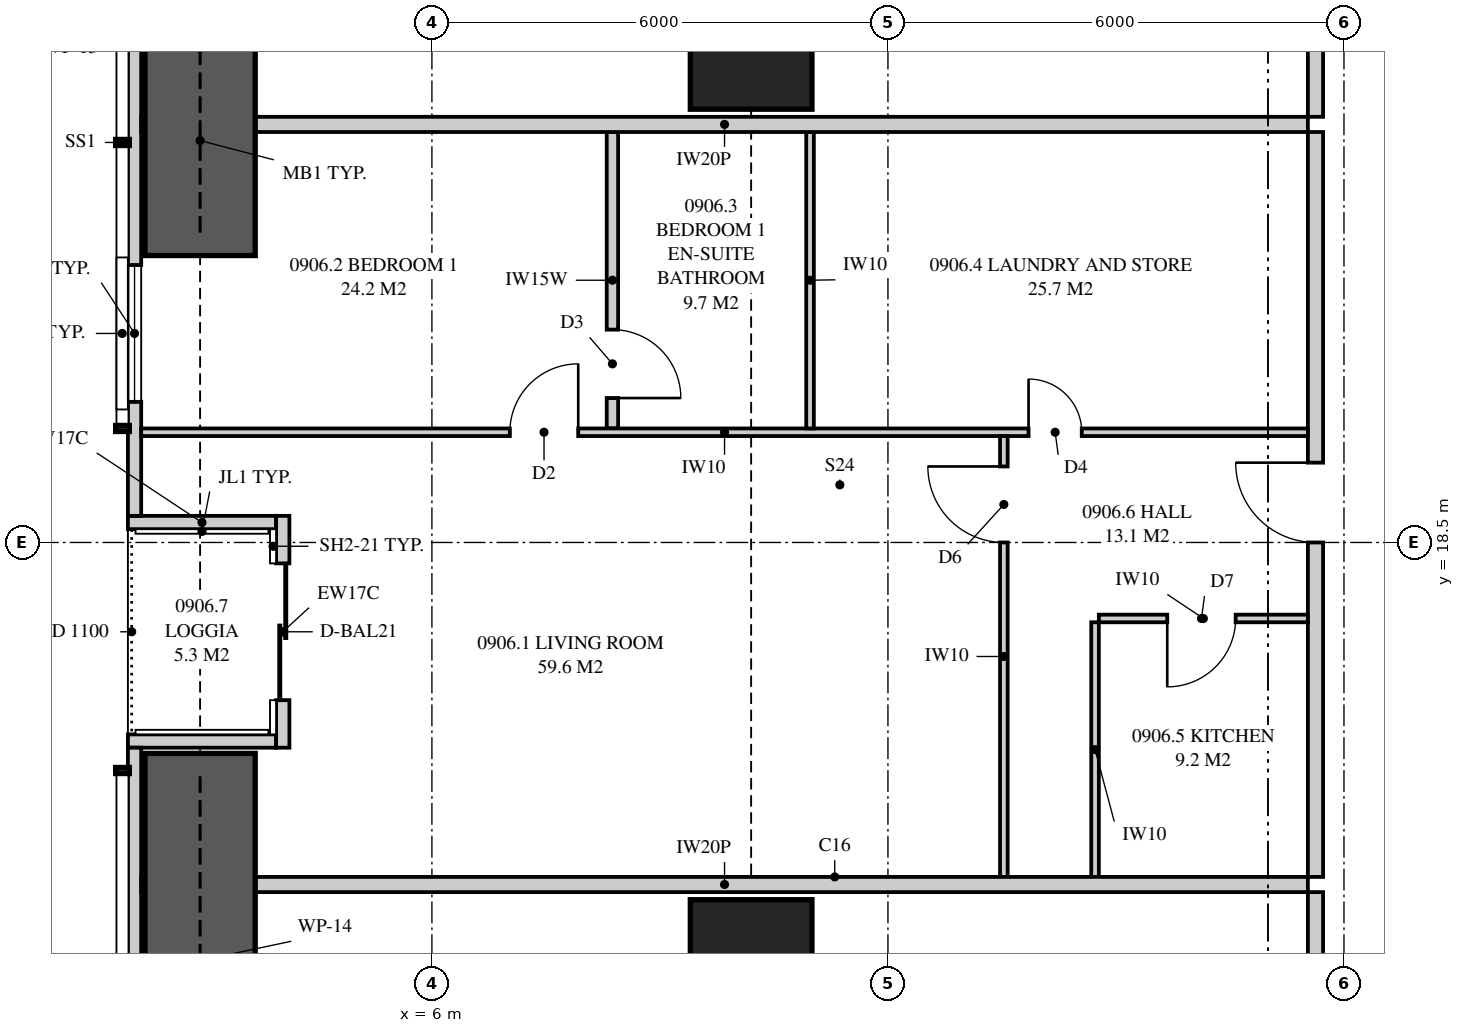
"""IFC4 building model, lengths in metres.
Left out: names, types, materials, properties, quantities, classifications, styles, units other than length and angle.
Written with IfcOpenShell. Run it as: python <this file> out.ifc"""

import sys

from ifc_helpers import new_model, si_unit, direction, frame, frame_2d, origin, origin_2d, place, context, subcontext, project, spatial, polyline, rectangle, outline, extrude, element, fill, save


model = new_model("IFC4")
c1 = context("Model", 3, precision=1e-05, world=origin(), true_north=direction((0.0, 1.0)))
c2 = subcontext(c1, "Body", "Model", "MODEL_VIEW")
j1 = project(units=[si_unit("LENGTHUNIT", "METRE"), si_unit("PLANEANGLEUNIT", "RADIAN")], contexts=[c1])
p1 = place(None, origin())
s1 = spatial("IfcSite", under=j1, at=p1, CompositionType="ELEMENT")
p2 = place(p1, origin())
s2 = spatial("IfcBuilding", under=s1, at=p2, CompositionType="ELEMENT")
p3 = place(p2, frame((0.0, 0.0, 37.75)))
s3 = spatial("IfcBuildingStorey", under=s2, at=p3, CompositionType="ELEMENT", Elevation=37.75)
for number, where, z_axis, x_axis in (
    (1, (10.2, 13.0, 0.0), (0.0, 0.0, 1.0), (1.0, 0.0, 0.0)),
    (2, (10.2, 25.0, 0.0), (0.0, 0.0, 1.0), (1.0, 0.0, 0.0)),
):
    element("IfcColumn", number, at=place(p3, frame(where, z_axis=z_axis, x_axis=x_axis)), inside=s3, PredefinedType="COLUMN", context=c2, shape_type="SweptSolid", body=[
        extrude(rectangle(XDim=1.6, YDim=1.6, at=origin_2d()), origin(), (0.0, 0.0, 1.0), 3.35),
    ])
p4 = place(p3, frame((2.087, 34.949, 0.0), z_axis=(0.0, 0.0, 1.0), x_axis=(0.0, -1.0, 0.0)))
e3 = element("IfcWall", 3, at=p4, inside=s3, PredefinedType="SOLIDWALL", context=c2, shape_type="SweptSolid", body=[
    extrude(outline(polyline([(0.0, 0.0), (16.099, 0.0), (16.099, 2.15), (9.949, 2.15), (9.949, 3.11), (9.823, 3.11), (9.823, 2.15), (9.73, 2.15), (9.73, 3.11), (0.0, 3.11), (0.0, 0.0)])), frame((0.0, 0.087, 0.0), z_axis=(0.0, -1.0, 0.0), x_axis=(1.0, 0.0, 0.0)), (0.0, 0.0, 1.0), 0.175),
])
p5 = place(p4, frame((2.757, 0.0, 0.4)))
e4 = element("IfcOpeningElement", 4, at=p5, cuts=e3, PredefinedType="OPENING", context=c2, shape_type="SweptSolid", body=[
    extrude(rectangle(XDim=1.8, YDim=1.7, at=frame_2d((0.9, 0.85))), frame((0.0, 0.097, 0.0), z_axis=(0.0, -1.0, 0.0), x_axis=(1.0, 0.0, 0.0)), (0.0, 0.0, 1.0), 0.195),
])
p6 = place(p4, frame((5.924, 0.0, 0.4)))
e5 = element("IfcOpeningElement", 5, at=p6, cuts=e3, PredefinedType="OPENING", context=c2, shape_type="SweptSolid", body=[
    extrude(rectangle(XDim=1.2, YDim=1.7, at=frame_2d((0.6, 0.85))), frame((0.0, 0.097, 0.0), z_axis=(0.0, -1.0, 0.0), x_axis=(1.0, 0.0, 0.0)), (0.0, 0.0, 1.0), 0.195),
])
p7 = place(p4, frame((12.799, 0.0, 0.4)))
e6 = element("IfcOpeningElement", 6, at=p7, cuts=e3, PredefinedType="OPENING", context=c2, shape_type="SweptSolid", body=[
    extrude(rectangle(XDim=1.8, YDim=1.7, at=frame_2d((0.9, 0.85))), frame((0.0, 0.097, 0.0), z_axis=(0.0, -1.0, 0.0), x_axis=(1.0, 0.0, 0.0)), (0.0, 0.0, 1.0), 0.195),
])
p8 = place(p3, frame((2.087, 15.8, 0.0), z_axis=(0.0, 0.0, 1.0), x_axis=(0.0, -1.0, 0.0)))
e7 = element("IfcWall", 7, at=p8, inside=s3, PredefinedType="SOLIDWALL", context=c2, shape_type="SweptSolid", body=[
    extrude(outline(polyline([(0.0, 0.0), (12.749, 0.0), (12.749, 3.11), (3.019, 3.11), (3.019, 2.15), (2.926, 2.15), (2.926, 3.11), (2.8, 3.11), (2.8, 2.15), (0.0, 2.15), (0.0, 0.0)])), frame((0.0, 0.087, 0.0), z_axis=(0.0, -1.0, 0.0), x_axis=(1.0, 0.0, 0.0)), (0.0, 0.0, 1.0), 0.175),
])
p9 = place(p8, frame((5.65, 0.0, 0.4)))
e8 = element("IfcOpeningElement", 8, at=p9, cuts=e7, PredefinedType="OPENING", context=c2, shape_type="SweptSolid", body=[
    extrude(rectangle(XDim=1.2, YDim=1.7, at=frame_2d((0.6, 0.85))), frame((0.0, 0.097, 0.0), z_axis=(0.0, -1.0, 0.0), x_axis=(1.0, 0.0, 0.0)), (0.0, 0.0, 1.0), 0.195),
])
p10 = place(p8, frame((8.691, 0.0, 0.4)))
e9 = element("IfcOpeningElement", 9, at=p10, cuts=e7, PredefinedType="OPENING", context=c2, shape_type="SweptSolid", body=[
    extrude(rectangle(XDim=1.8, YDim=1.7, at=frame_2d((0.9, 0.85))), frame((0.0, 0.097, 0.0), z_axis=(0.0, -1.0, 0.0), x_axis=(1.0, 0.0, 0.0)), (0.0, 0.0, 1.0), 0.195),
])
p11 = place(p3, frame((4.038, 18.85, 0.0), z_axis=(0.0, 0.0, 1.0), x_axis=(0.0, -1.0, 0.0)))
e10 = element("IfcWall", 10, at=p11, inside=s3, PredefinedType="SOLIDWALL", context=c2, shape_type="SweptSolid", body=[
    extrude(rectangle(XDim=3.05, YDim=0.175, at=frame_2d((1.525, 0.0))), origin(), (0.0, 0.0, 1.0), 3.11),
])
p12 = place(p11, frame((0.625, 0.0, 0.0)))
e11 = element("IfcOpeningElement", 11, at=p12, cuts=e10, PredefinedType="OPENING", context=c2, shape_type="SweptSolid", body=[
    extrude(rectangle(XDim=1.8, YDim=2.1, at=frame_2d((0.9, 1.05))), frame((0.0, 0.097, 0.0), z_axis=(0.0, -1.0, 0.0), x_axis=(1.0, 0.0, 0.0)), (0.0, 0.0, 1.0), 0.195),
])
for number, where, z_axis, x_axis in (
    (12, (2.0, 18.762, 0.0), (0.0, 0.0, 1.0), (1.0, 0.0, 0.0)),
    (13, (2.0, 15.887, 0.0), (0.0, 0.0, 1.0), (1.0, 0.0, 0.0)),
):
    element("IfcWall", number, at=place(p3, frame(where, z_axis=z_axis, x_axis=x_axis)), inside=s3, PredefinedType="SOLIDWALL", context=c2, shape_type="SweptSolid", body=[
        extrude(outline(polyline([(0.0, 0.0), (1.95, 0.0), (1.95, 3.11), (1.75, 3.11), (1.75, 2.15), (0.15, 2.15), (0.15, 3.11), (0.0, 3.11), (0.0, 0.0)])), frame((0.0, 0.087, 0.0), z_axis=(0.0, -1.0, 0.0), x_axis=(1.0, 0.0, 0.0)), (0.0, 0.0, 1.0), 0.175),
    ])
p13 = place(p3, frame((2.175, 14.0, 0.0), z_axis=(0.0, 0.0, 1.0), x_axis=(1.0, 0.0, 0.0)))
e14 = element("IfcWall", 14, at=p13, inside=s3, PredefinedType="PARTITIONING", context=c2, shape_type="SweptSolid", body=[
    extrude(outline(polyline([(0.529, 2.15), (0.0, 2.15), (0.0, 0.0), (0.529, 0.0), (0.529, 0.815), (1.021, 0.815), (1.021, 0.0), (15.35, 0.0), (15.35, 3.11), (9.335, 3.11), (9.335, 2.51), (6.715, 2.51), (6.715, 3.11), (1.685, 3.11), (1.685, 2.15), (1.021, 2.15), (1.021, 1.335), (0.529, 1.335), (0.529, 2.15)])), frame((0.0, 0.1, 0.0), z_axis=(0.0, -1.0, 0.0), x_axis=(1.0, 0.0, 0.0)), (0.0, 0.0, 1.0), 0.2),
])
p14 = place(p3, frame((17.625, 7.75, 0.0), z_axis=(0.0, 0.0, 1.0), x_axis=(0.0, 1.0, 0.0)))
e15 = element("IfcWall", 15, at=p14, inside=s3, PredefinedType="PARTITIONING", context=c2, shape_type="SweptSolid", body=[
    extrude(outline(polyline([(0.0, 0.0), (6.15, 0.0), (6.15, 3.11), (5.587, 3.11), (5.587, 2.541), (4.913, 2.541), (4.913, 3.11), (0.0, 3.11), (0.0, 0.0)])), frame((0.0, 0.1, 0.0), z_axis=(0.0, -1.0, 0.0), x_axis=(1.0, 0.0, 0.0)), (0.0, 0.0, 1.0), 0.2),
])
p15 = place(p14, frame((2.175, 0.0, 0.0)))
e16 = element("IfcOpeningElement", 16, at=p15, cuts=e15, PredefinedType="OPENING", context=c2, shape_type="SweptSolid", body=[
    extrude(rectangle(XDim=1.8, YDim=2.1, at=frame_2d((0.9, 1.05))), frame((0.0, 0.11, 0.0), z_axis=(0.0, -1.0, 0.0), x_axis=(1.0, 0.0, 0.0)), (0.0, 0.0, 1.0), 0.22),
])
p16 = place(p3, frame((2.175, 24.0, 0.0), z_axis=(0.0, 0.0, 1.0), x_axis=(1.0, 0.0, 0.0)))
e17 = element("IfcWall", 17, at=p16, inside=s3, PredefinedType="PARTITIONING", context=c2, shape_type="SweptSolid", body=[
    extrude(outline(polyline([(0.529, 2.15), (0.0, 2.15), (0.0, 0.0), (0.529, 0.0), (0.529, 0.815), (1.021, 0.815), (1.021, 0.0), (15.35, 0.0), (15.35, 3.11), (9.335, 3.11), (9.335, 2.51), (6.715, 2.51), (6.715, 3.11), (1.685, 3.11), (1.685, 2.15), (1.021, 2.15), (1.021, 1.335), (0.529, 1.335), (0.529, 2.15)])), frame((0.0, 0.1, 0.0), z_axis=(0.0, -1.0, 0.0), x_axis=(1.0, 0.0, 0.0)), (0.0, 0.0, 1.0), 0.2),
])
p17 = place(p3, frame((17.625, 14.1, 0.0), z_axis=(0.0, 0.0, 1.0), x_axis=(0.0, 1.0, 0.0)))
e18 = element("IfcWall", 18, at=p17, inside=s3, PredefinedType="PARTITIONING", context=c2, shape_type="SweptSolid", body=[
    extrude(rectangle(XDim=9.8, YDim=0.2, at=frame_2d((4.9, 0.0))), origin(), (0.0, 0.0, 1.0), 3.11),
])
p18 = place(p17, frame((4.4, 0.0, 0.0)))
e19 = element("IfcOpeningElement", 19, at=p18, cuts=e18, PredefinedType="OPENING", context=c2, shape_type="SweptSolid", body=[
    extrude(rectangle(XDim=1.05, YDim=2.2, at=frame_2d((0.525, 1.1))), frame((0.0, 0.11, 0.0), z_axis=(0.0, -1.0, 0.0), x_axis=(1.0, 0.0, 0.0)), (0.0, 0.0, 1.0), 0.22),
])
p19 = place(p3, frame((2.175, 19.95, 0.0), z_axis=(0.0, 0.0, 1.0), x_axis=(1.0, 0.0, 0.0)))
e20 = element("IfcWall", 20, at=p19, inside=s3, PredefinedType="PARTITIONING", context=c2, shape_type="SweptSolid", body=[
    extrude(outline(polyline([(0.0, 0.0), (15.35, 0.0), (15.35, 3.11), (9.285, 3.11), (9.285, 2.51), (6.765, 2.51), (6.765, 3.11), (1.635, 3.11), (1.635, 2.15), (0.0, 2.15), (0.0, 3.11), (0.0, 0.0)])), frame((0.0, 0.05, 0.0), z_axis=(0.0, -1.0, 0.0), x_axis=(1.0, 0.0, 0.0)), (0.0, 0.0, 1.0), 0.1),
])
p20 = place(p19, frame((4.85, 0.0, 0.0)))
e21 = element("IfcOpeningElement", 21, at=p20, cuts=e20, PredefinedType="OPENING", context=c2, shape_type="SweptSolid", body=[
    extrude(rectangle(XDim=0.9, YDim=2.1, at=frame_2d((0.45, 1.05))), frame((0.0, 0.06, 0.0), z_axis=(0.0, -1.0, 0.0), x_axis=(1.0, 0.0, 0.0)), (0.0, 0.0, 1.0), 0.12),
])
p21 = place(p19, frame((11.675, 0.0, 0.0)))
e22 = element("IfcOpeningElement", 22, at=p21, cuts=e20, PredefinedType="OPENING", context=c2, shape_type="SweptSolid", body=[
    extrude(rectangle(XDim=0.7, YDim=2.1, at=frame_2d((0.35, 1.05))), frame((0.0, 0.06, 0.0), z_axis=(0.0, -1.0, 0.0), x_axis=(1.0, 0.0, 0.0)), (0.0, 0.0, 1.0), 0.12),
])
p22 = place(p3, frame((8.375, 20.0, 0.0), z_axis=(0.0, 0.0, 1.0), x_axis=(0.0, 1.0, 0.0)))
e23 = element("IfcWall", 23, at=p22, inside=s3, PredefinedType="PLUMBINGWALL", context=c2, shape_type="SweptSolid", body=[
    extrude(rectangle(XDim=3.9, YDim=0.15, at=frame_2d((1.95, 0.0))), origin(), (0.0, 0.0, 1.0), 3.11),
])
p23 = place(p22, frame((0.4, 0.0, 0.0)))
e24 = element("IfcOpeningElement", 24, at=p23, cuts=e23, PredefinedType="OPENING", context=c2, shape_type="SweptSolid", body=[
    extrude(rectangle(XDim=0.9, YDim=2.1, at=frame_2d((0.45, 1.05))), frame((0.0, 0.085, 0.0), z_axis=(0.0, -1.0, 0.0), x_axis=(1.0, 0.0, 0.0)), (0.0, 0.0, 1.0), 0.17),
])
p24 = place(p3, frame((10.975, 20.0, 0.0), z_axis=(0.0, 0.0, 1.0), x_axis=(0.0, 1.0, 0.0)))
e25 = element("IfcWall", 25, at=p24, inside=s3, PredefinedType="PARTITIONING", context=c2, shape_type="SweptSolid", body=[
    extrude(outline(polyline([(0.0, 0.0), (3.9, 0.0), (3.9, 3.11), (3.9, 2.51), (0.0, 2.51), (0.0, 3.11), (0.0, 0.0)])), frame((0.0, 0.05, 0.0), z_axis=(0.0, -1.0, 0.0), x_axis=(1.0, 0.0, 0.0)), (0.0, 0.0, 1.0), 0.1),
])
p25 = place(p3, frame((13.525, 14.1, 0.0), z_axis=(0.0, 0.0, 1.0), x_axis=(0.0, 1.0, 0.0)))
e26 = element("IfcWall", 26, at=p25, inside=s3, PredefinedType="PARTITIONING", context=c2, shape_type="SweptSolid", body=[
    extrude(rectangle(XDim=5.8, YDim=0.1, at=frame_2d((2.9, 0.0))), origin(), (0.0, 0.0, 1.0), 3.11),
])
p26 = place(p25, frame((4.4, 0.0, 0.0)))
e27 = element("IfcOpeningElement", 27, at=p26, cuts=e26, PredefinedType="OPENING", context=c2, shape_type="SweptSolid", body=[
    extrude(rectangle(XDim=1.0, YDim=2.1, at=frame_2d((0.5, 1.05))), frame((0.0, 0.06, 0.0), z_axis=(0.0, -1.0, 0.0), x_axis=(1.0, 0.0, 0.0)), (0.0, 0.0, 1.0), 0.12),
])
p27 = place(p3, frame((14.725, 14.1, 0.0), z_axis=(0.0, 0.0, 1.0), x_axis=(0.0, 1.0, 0.0)))
e28 = element("IfcWall", 28, at=p27, inside=s3, PredefinedType="PARTITIONING", context=c2, shape_type="SweptSolid", body=[
    extrude(rectangle(XDim=3.35, YDim=0.1, at=frame_2d((1.675, 0.0))), origin(), (0.0, 0.0, 1.0), 3.11),
])
p28 = place(p3, frame((14.775, 17.5, 0.0), z_axis=(0.0, 0.0, 1.0), x_axis=(1.0, 0.0, 0.0)))
e29 = element("IfcWall", 29, at=p28, inside=s3, PredefinedType="PARTITIONING", context=c2, shape_type="SweptSolid", body=[
    extrude(rectangle(XDim=2.75, YDim=0.1, at=frame_2d((1.375, 0.0))), origin(), (0.0, 0.0, 1.0), 3.11),
])
p29 = place(p28, frame((0.9, 0.0, 0.0)))
e30 = element("IfcOpeningElement", 30, at=p29, cuts=e29, PredefinedType="OPENING", context=c2, shape_type="SweptSolid", body=[
    extrude(rectangle(XDim=0.9, YDim=2.1, at=frame_2d((0.45, 1.05))), frame((0.0, 0.06, 0.0), z_axis=(0.0, -1.0, 0.0), x_axis=(1.0, 0.0, 0.0)), (0.0, 0.0, 1.0), 0.12),
])
p30 = place(p3, frame((17.625, 24.1, 0.0), z_axis=(0.0, 0.0, 1.0), x_axis=(0.0, 1.0, 0.0)))
e31 = element("IfcWall", 31, at=p30, inside=s3, PredefinedType="PARTITIONING", context=c2, shape_type="SweptSolid", body=[
    extrude(outline(polyline([(0.0, 0.0), (5.15, 0.0), (5.15, 3.11), (1.237, 3.11), (1.237, 2.541), (0.562, 2.541), (0.562, 3.11), (0.0, 3.11), (0.0, 0.0)])), frame((0.0, 0.1, 0.0), z_axis=(0.0, -1.0, 0.0), x_axis=(1.0, 0.0, 0.0)), (0.0, 0.0, 1.0), 0.2),
])
p31 = place(p30, frame((1.675, 0.0, 0.0)))
e32 = element("IfcOpeningElement", 32, at=p31, cuts=e31, PredefinedType="OPENING", context=c2, shape_type="SweptSolid", body=[
    extrude(rectangle(XDim=1.8, YDim=2.1, at=frame_2d((0.9, 1.05))), frame((0.0, 0.11, 0.0), z_axis=(0.0, -1.0, 0.0), x_axis=(1.0, 0.0, 0.0)), (0.0, 0.0, 1.0), 0.22),
])
for number, where, z_axis, x_axis in (
    (33, (2.95, 22.275, 0.0), (0.0, 0.0, 1.0), (0.0, 1.0, 0.0)),
    (34, (2.95, 10.275, 0.0), (0.0, 0.0, 1.0), (0.0, 1.0, 0.0)),
):
    element("IfcWall", number, at=place(p3, frame(where, z_axis=z_axis, x_axis=x_axis)), inside=s3, PredefinedType="SHEAR", context=c2, shape_type="SweptSolid", body=[
        extrude(rectangle(XDim=5.45, YDim=1.45, at=frame_2d((2.725, 0.0))), origin(), (0.0, 0.0, 1.0), 3.35),
    ])
p32 = place(p7, origin())
e35 = element("IfcWindow", 35, at=p32, inside=s3, PartitioningType="SINGLE_PANEL", PredefinedType="WINDOW", context=c2, shape_type="SweptSolid", body=[
    extrude(rectangle(XDim=1.8, YDim=1.7, at=frame_2d((0.9, 0.85))), frame((0.0, 0.03, 0.0), z_axis=(0.0, -1.0, 0.0), x_axis=(1.0, 0.0, 0.0)), (0.0, 0.0, 1.0), 0.06),
])
fill(e6, e35)
p33 = place(p12, origin())
e36 = element("IfcDoor", 36, at=p33, inside=s3, OperationType="SLIDING_TO_LEFT", PredefinedType="DOOR", context=c2, shape_type="SweptSolid", body=[
    extrude(rectangle(XDim=1.8, YDim=2.1, at=frame_2d((0.9, 1.05))), frame((0.0, 0.025, 0.0), z_axis=(0.0, -1.0, 0.0), x_axis=(1.0, 0.0, 0.0)), (0.0, 0.0, 1.0), 0.05),
])
fill(e11, e36)
p34 = place(p18, origin())
e37 = element("IfcDoor", 37, at=p34, inside=s3, OperationType="SINGLE_SWING_RIGHT", PredefinedType="DOOR", context=c2, shape_type="SweptSolid", body=[
    extrude(rectangle(XDim=1.05, YDim=2.2, at=frame_2d((0.525, 1.1))), frame((0.0, 0.025, 0.0), z_axis=(0.0, -1.0, 0.0), x_axis=(1.0, 0.0, 0.0)), (0.0, 0.0, 1.0), 0.05),
])
fill(e19, e37)
p35 = place(p20, origin())
e38 = element("IfcDoor", 38, at=p35, inside=s3, OperationType="SINGLE_SWING_RIGHT", PredefinedType="DOOR", context=c2, shape_type="SweptSolid", body=[
    extrude(rectangle(XDim=0.9, YDim=2.1, at=frame_2d((0.45, 1.05))), frame((0.0, 0.025, 0.0), z_axis=(0.0, -1.0, 0.0), x_axis=(1.0, 0.0, 0.0)), (0.0, 0.0, 1.0), 0.05),
])
fill(e21, e38)
p36 = place(p23, frame((0.9, 0.0, 0.0), z_axis=(0.0, 0.0, 1.0), x_axis=(-1.0, 0.0, 0.0)))
e39 = element("IfcDoor", 39, at=p36, inside=s3, OperationType="SINGLE_SWING_RIGHT", PredefinedType="DOOR", context=c2, shape_type="SweptSolid", body=[
    extrude(rectangle(XDim=0.9, YDim=2.1, at=frame_2d((0.45, 1.05))), frame((0.0, 0.025, 0.0), z_axis=(0.0, -1.0, 0.0), x_axis=(1.0, 0.0, 0.0)), (0.0, 0.0, 1.0), 0.05),
])
fill(e24, e39)
p37 = place(p21, origin())
e40 = element("IfcDoor", 40, at=p37, inside=s3, OperationType="SINGLE_SWING_LEFT", PredefinedType="DOOR", context=c2, shape_type="SweptSolid", body=[
    extrude(rectangle(XDim=0.7, YDim=2.1, at=frame_2d((0.35, 1.05))), frame((0.0, 0.025, 0.0), z_axis=(0.0, -1.0, 0.0), x_axis=(1.0, 0.0, 0.0)), (0.0, 0.0, 1.0), 0.05),
])
fill(e22, e40)
p38 = place(p29, frame((0.9, 0.0, 0.0), z_axis=(0.0, 0.0, 1.0), x_axis=(-1.0, 0.0, 0.0)))
e41 = element("IfcDoor", 41, at=p38, inside=s3, OperationType="SINGLE_SWING_RIGHT", PredefinedType="DOOR", context=c2, shape_type="SweptSolid", body=[
    extrude(rectangle(XDim=0.9, YDim=2.1, at=frame_2d((0.45, 1.05))), frame((0.0, 0.025, 0.0), z_axis=(0.0, -1.0, 0.0), x_axis=(1.0, 0.0, 0.0)), (0.0, 0.0, 1.0), 0.05),
])
fill(e30, e41)
p39 = place(p26, origin())
e42 = element("IfcDoor", 42, at=p39, inside=s3, OperationType="SINGLE_SWING_RIGHT", PredefinedType="DOOR", context=c2, shape_type="SweptSolid", body=[
    extrude(rectangle(XDim=1.0, YDim=2.1, at=frame_2d((0.5, 1.05))), frame((0.0, 0.025, 0.0), z_axis=(0.0, -1.0, 0.0), x_axis=(1.0, 0.0, 0.0)), (0.0, 0.0, 1.0), 0.05),
])
fill(e27, e42)
save(model, sys.argv[1])
